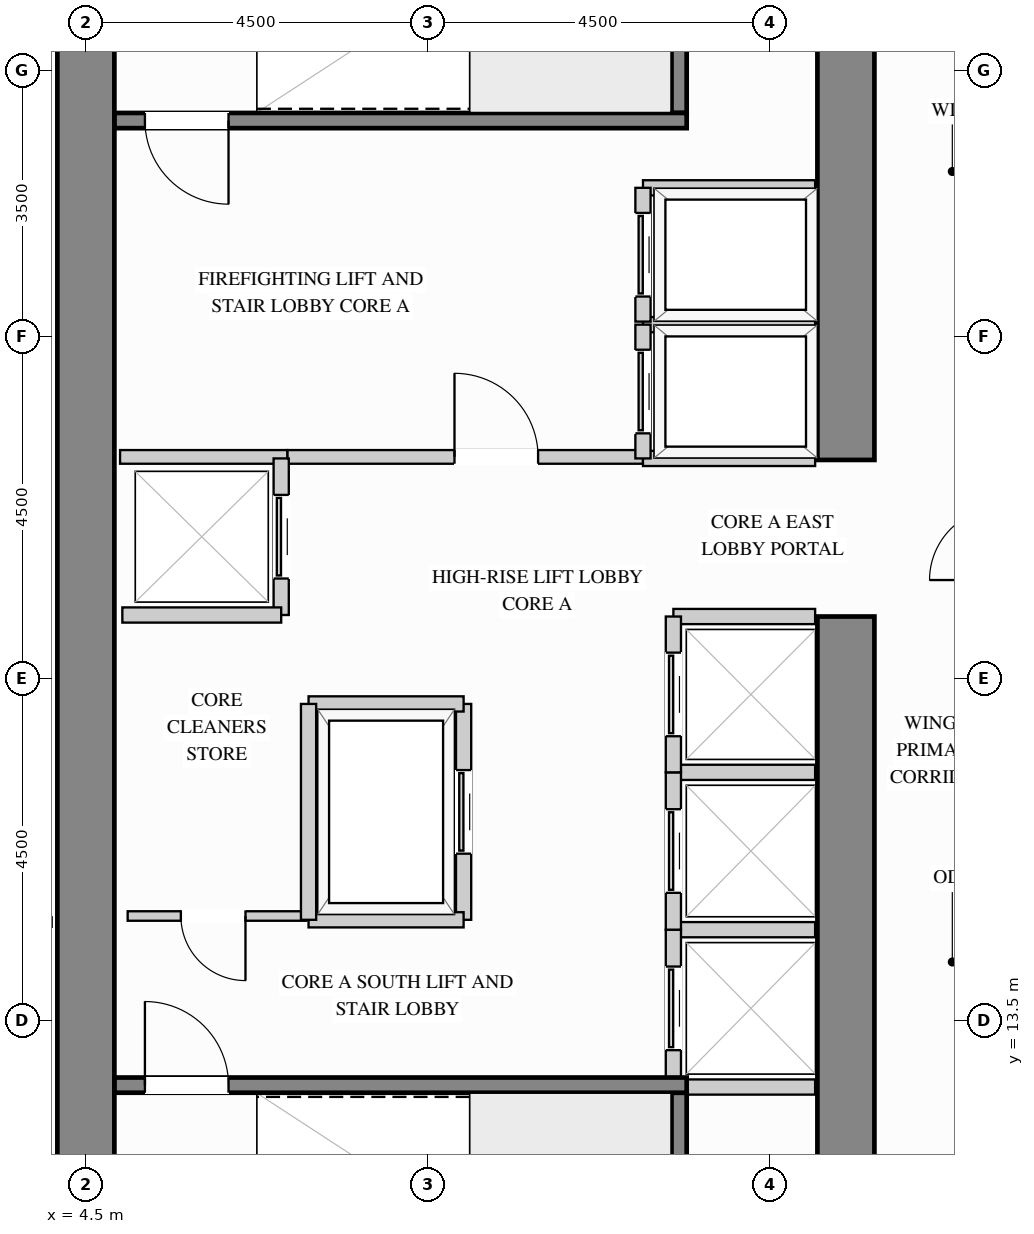
"""IFC4 building model, lengths in metres.
Left out: names, types, materials, properties, quantities, classifications, styles, units other than length and angle.
Written with IfcOpenShell. Run it as: python <this file> out.ifc"""

import sys

from ifc_helpers import new_model, si_unit, direction, frame, frame_2d, origin, place, context, subcontext, project, spatial, rectangle, extrude, source, transform, mapped, element, fill, save


model = new_model("IFC4")
c1 = context("Model", 3, precision=1e-05, world=origin(), true_north=direction((0.0, 1.0)))
c2 = subcontext(c1, "Body", "Model", "MODEL_VIEW")
j1 = project(units=[si_unit("LENGTHUNIT", "METRE"), si_unit("PLANEANGLEUNIT", "RADIAN")], contexts=[c1])
p1 = place(None, origin())
s1 = spatial("IfcSite", under=j1, at=p1, CompositionType="ELEMENT")
p2 = place(p1, origin())
s2 = spatial("IfcBuilding", under=s1, at=p2, CompositionType="ELEMENT")
p3 = place(p2, frame((0.0, 0.0, 102.6)))
s3 = spatial("IfcBuildingStorey", under=s2, at=p3, CompositionType="ELEMENT", Elevation=102.6)
m1 = source(origin(), c2, "Body", "SweptSolid", [
    extrude(rectangle(XDim=9.945, YDim=0.75, at=frame_2d((4.973, 0.0))), origin(), (0.0, 0.0, 1.0), 3.38),
])
p4 = place(p3, frame((14.5, 8.875, 0.0), z_axis=(0.0, 0.0, 1.0), x_axis=(0.0, 1.0, 0.0)))
e1 = element("IfcWall", 1, at=p4, inside=s3, PredefinedType="SHEAR", context=c2, shape_type="MappedRepresentation", body=[
    mapped(m1, transform((0.0, 0.0, 0.0), x_axis=(1.0, 0.0, 0.0), y_axis=(0.0, 1.0, 0.0), z_axis=(0.0, 0.0, 1.0))),
])
m2 = source(origin(), c2, "Body", "SweptSolid", [
    extrude(rectangle(XDim=8.245, YDim=0.75, at=frame_2d((4.123, 0.0))), origin(), (0.0, 0.0, 1.0), 3.38),
])
p5 = place(p3, frame((14.5, 20.88, 0.0), z_axis=(0.0, 0.0, 1.0), x_axis=(0.0, 1.0, 0.0)))
e2 = element("IfcWall", 2, at=p5, inside=s3, PredefinedType="SHEAR", context=c2, shape_type="MappedRepresentation", body=[
    mapped(m2, transform((0.0, 0.0, 0.0), x_axis=(1.0, 0.0, 0.0), y_axis=(0.0, 1.0, 0.0), z_axis=(0.0, 0.0, 1.0))),
])
m3 = source(origin(), c2, "Body", "SweptSolid", [
    extrude(rectangle(XDim=20.25, YDim=0.75, at=frame_2d((10.125, 0.0))), origin(), (0.0, 0.0, 1.0), 3.38),
])
p6 = place(p3, frame((4.5, 8.875, 0.0), z_axis=(0.0, 0.0, 1.0), x_axis=(0.0, 1.0, 0.0)))
e3 = element("IfcWall", 3, at=p6, inside=s3, PredefinedType="SHEAR", context=c2, shape_type="MappedRepresentation", body=[
    mapped(m3, transform((0.0, 0.0, 0.0), x_axis=(1.0, 0.0, 0.0), y_axis=(0.0, 1.0, 0.0), z_axis=(0.0, 0.0, 1.0))),
])
p7 = place(p3, frame((7.15, 20.92, 0.0), z_axis=(0.0, 0.0, 1.0), x_axis=(1.0, 0.0, 0.0)))
e4 = element("IfcWall", 4, at=p7, inside=s3, PredefinedType="PARTITIONING", context=c2, shape_type="SweptSolid", body=[
    extrude(rectangle(XDim=4.68, YDim=0.18, at=frame_2d((2.34, 0.0))), origin(), (0.0, 0.0, 1.0), 3.365),
])
p8 = place(p7, frame((2.2, 0.0, 0.0)))
e5 = element("IfcOpeningElement", 5, at=p8, cuts=e4, PredefinedType="OPENING", context=c2, shape_type="SweptSolid", body=[
    extrude(rectangle(XDim=1.1, YDim=2.15, at=frame_2d((0.55, 1.075))), frame((0.0, 0.1, 0.0), z_axis=(0.0, -1.0, 0.0), x_axis=(1.0, 0.0, 0.0)), (0.0, 0.0, 1.0), 0.2),
])
m4 = source(origin(), c2, "Body", "SweptSolid", [
    extrude(rectangle(XDim=2.2, YDim=0.18, at=frame_2d((1.1, 0.0))), origin(), (0.0, 0.0, 1.0), 3.365),
])
p9 = place(p3, frame((4.95, 20.92, 0.0), z_axis=(0.0, 0.0, 1.0), x_axis=(1.0, 0.0, 0.0)))
e6 = element("IfcWall", 6, at=p9, inside=s3, PredefinedType="PARTITIONING", context=c2, shape_type="MappedRepresentation", body=[
    mapped(m4, transform((0.0, 0.0, 0.0), x_axis=(1.0, 0.0, 0.0), y_axis=(0.0, 1.0, 0.0), z_axis=(0.0, 0.0, 1.0))),
])
p10 = place(p3, frame((5.05, 14.88, 0.0), z_axis=(0.0, 0.0, 1.0), x_axis=(1.0, 0.0, 0.0)))
e7 = element("IfcWall", 7, at=p10, inside=s3, PredefinedType="PARTITIONING", context=c2, shape_type="SweptSolid", body=[
    extrude(rectangle(XDim=2.35, YDim=0.125, at=frame_2d((1.175, 0.0))), origin(), (0.0, 0.0, 1.0), 3.365),
])
p11 = place(p10, frame((0.7, 0.0, 0.0)))
e8 = element("IfcOpeningElement", 8, at=p11, cuts=e7, PredefinedType="OPENING", context=c2, shape_type="SweptSolid", body=[
    extrude(rectangle(XDim=0.85, YDim=2.1, at=frame_2d((0.425, 1.05))), frame((0.0, 0.073, 0.0), z_axis=(0.0, -1.0, 0.0), x_axis=(1.0, 0.0, 0.0)), (0.0, 0.0, 1.0), 0.145),
])
m5 = source(origin(), c2, "Body", "SweptSolid", [
    extrude(rectangle(XDim=3.698, YDim=0.125, at=frame_2d((1.849, 0.0))), origin(), (0.0, 0.0, 1.0), 3.365),
])
p12 = place(p3, frame((0.352, 14.8, 0.0), z_axis=(0.0, 0.0, 1.0), x_axis=(1.0, 0.0, 0.0)))
e9 = element("IfcWall", 9, at=p12, inside=s3, PredefinedType="PARTITIONING", context=c2, shape_type="MappedRepresentation", body=[
    mapped(m5, transform((0.0, 0.0, 0.0), x_axis=(1.0, 0.0, 0.0), y_axis=(0.0, 1.0, 0.0), z_axis=(0.0, 0.0, 1.0))),
])
m6 = source(origin(), c2, "Body", "SweptSolid", [
    extrude(rectangle(XDim=2.265, YDim=0.2, at=frame_2d((1.132, 0.0))), origin(), (0.0, 0.0, 1.0), 3.365),
])
for number, where, z_axis, x_axis in (
    (10, (11.83, 22.66, 0.0), (0.0, 0.0, 1.0), (1.0, 0.0, 0.0)),
    (11, (11.83, 20.9, 0.0), (0.0, 0.0, 1.0), (1.0, 0.0, 0.0)),
):
    element("IfcWall", number, at=place(p3, frame(where, z_axis=z_axis, x_axis=x_axis)), inside=s3, PredefinedType="PARTITIONING", context=c2, shape_type="MappedRepresentation", body=[
        mapped(m6, transform((0.0, 0.0, 0.0), x_axis=(1.0, 0.0, 0.0), y_axis=(0.0, 1.0, 0.0), z_axis=(0.0, 0.0, 1.0))),
    ])
p13 = place(p3, frame((11.83, 20.9, 0.0), z_axis=(0.0, 0.0, 1.0), x_axis=(0.0, 1.0, 0.0)))
e12 = element("IfcWall", 12, at=p13, inside=s3, PredefinedType="PARTITIONING", context=c2, shape_type="SweptSolid", body=[
    extrude(rectangle(XDim=1.76, YDim=0.2, at=frame_2d((0.88, 0.0))), origin(), (0.0, 0.0, 1.0), 3.365),
])
p14 = place(p13, frame((0.33, 0.0, 0.0)))
e13 = element("IfcOpeningElement", 13, at=p14, cuts=e12, PredefinedType="OPENING", context=c2, shape_type="SweptSolid", body=[
    extrude(rectangle(XDim=1.1, YDim=2.2, at=frame_2d((0.55, 1.1))), frame((0.0, 0.11, 0.0), z_axis=(0.0, -1.0, 0.0), x_axis=(1.0, 0.0, 0.0)), (0.0, 0.0, 1.0), 0.22),
])
p15 = place(p3, frame((11.83, 24.46, 0.0), z_axis=(0.0, 0.0, 1.0), x_axis=(1.0, 0.0, 0.0)))
e14 = element("IfcWall", 14, at=p15, inside=s3, PredefinedType="PARTITIONING", context=c2, shape_type="MappedRepresentation", body=[
    mapped(m6, transform((0.0, 0.0, 0.0), x_axis=(1.0, 0.0, 0.0), y_axis=(0.0, 1.0, 0.0), z_axis=(0.0, 0.0, 1.0))),
])
p16 = place(p3, frame((11.83, 22.7, 0.0), z_axis=(0.0, 0.0, 1.0), x_axis=(0.0, 1.0, 0.0)))
e15 = element("IfcWall", 15, at=p16, inside=s3, PredefinedType="PARTITIONING", context=c2, shape_type="SweptSolid", body=[
    extrude(rectangle(XDim=1.76, YDim=0.2, at=frame_2d((0.88, 0.0))), origin(), (0.0, 0.0, 1.0), 3.365),
])
p17 = place(p16, frame((0.33, 0.0, 0.0)))
e16 = element("IfcOpeningElement", 16, at=p17, cuts=e15, PredefinedType="OPENING", context=c2, shape_type="SweptSolid", body=[
    extrude(rectangle(XDim=1.1, YDim=2.2, at=frame_2d((0.55, 1.1))), frame((0.0, 0.11, 0.0), z_axis=(0.0, -1.0, 0.0), x_axis=(1.0, 0.0, 0.0)), (0.0, 0.0, 1.0), 0.22),
])
m7 = source(origin(), c2, "Body", "SweptSolid", [
    extrude(rectangle(XDim=1.865, YDim=0.2, at=frame_2d((0.933, 0.0))), origin(), (0.0, 0.0, 1.0), 3.365),
])
for number, where, z_axis, x_axis in (
    (17, (12.23, 14.7, 0.0), (0.0, 0.0, 1.0), (1.0, 0.0, 0.0)),
    (18, (12.23, 12.63, 0.0), (0.0, 0.0, 1.0), (1.0, 0.0, 0.0)),
):
    element("IfcWall", number, at=place(p3, frame(where, z_axis=z_axis, x_axis=x_axis)), inside=s3, PredefinedType="PARTITIONING", context=c2, shape_type="MappedRepresentation", body=[
        mapped(m7, transform((0.0, 0.0, 0.0), x_axis=(1.0, 0.0, 0.0), y_axis=(0.0, 1.0, 0.0), z_axis=(0.0, 0.0, 1.0))),
    ])
p18 = place(p3, frame((12.23, 12.63, 0.0), z_axis=(0.0, 0.0, 1.0), x_axis=(0.0, 1.0, 0.0)))
e19 = element("IfcWall", 19, at=p18, inside=s3, PredefinedType="PARTITIONING", context=c2, shape_type="SweptSolid", body=[
    extrude(rectangle(XDim=2.07, YDim=0.2, at=frame_2d((1.035, 0.0))), origin(), (0.0, 0.0, 1.0), 3.365),
])
p19 = place(p18, frame((0.485, 0.0, 0.0)))
e20 = element("IfcOpeningElement", 20, at=p19, cuts=e19, PredefinedType="OPENING", context=c2, shape_type="SweptSolid", body=[
    extrude(rectangle(XDim=1.1, YDim=2.2, at=frame_2d((0.55, 1.1))), frame((0.0, 0.11, 0.0), z_axis=(0.0, -1.0, 0.0), x_axis=(1.0, 0.0, 0.0)), (0.0, 0.0, 1.0), 0.22),
])
p20 = place(p3, frame((12.23, 16.77, 0.0), z_axis=(0.0, 0.0, 1.0), x_axis=(1.0, 0.0, 0.0)))
e21 = element("IfcWall", 21, at=p20, inside=s3, PredefinedType="PARTITIONING", context=c2, shape_type="MappedRepresentation", body=[
    mapped(m7, transform((0.0, 0.0, 0.0), x_axis=(1.0, 0.0, 0.0), y_axis=(0.0, 1.0, 0.0), z_axis=(0.0, 0.0, 1.0))),
])
p21 = place(p3, frame((12.23, 14.7, 0.0), z_axis=(0.0, 0.0, 1.0), x_axis=(0.0, 1.0, 0.0)))
e22 = element("IfcWall", 22, at=p21, inside=s3, PredefinedType="PARTITIONING", context=c2, shape_type="SweptSolid", body=[
    extrude(rectangle(XDim=2.07, YDim=0.2, at=frame_2d((1.035, 0.0))), origin(), (0.0, 0.0, 1.0), 3.365),
])
p22 = place(p21, frame((0.485, 0.0, 0.0)))
e23 = element("IfcOpeningElement", 23, at=p22, cuts=e22, PredefinedType="OPENING", context=c2, shape_type="SweptSolid", body=[
    extrude(rectangle(XDim=1.1, YDim=2.2, at=frame_2d((0.55, 1.1))), frame((0.0, 0.11, 0.0), z_axis=(0.0, -1.0, 0.0), x_axis=(1.0, 0.0, 0.0)), (0.0, 0.0, 1.0), 0.22),
])
p23 = place(p3, frame((12.23, 18.82, 0.0), z_axis=(0.0, 0.0, 1.0), x_axis=(1.0, 0.0, 0.0)))
e24 = element("IfcWall", 24, at=p23, inside=s3, PredefinedType="PARTITIONING", context=c2, shape_type="MappedRepresentation", body=[
    mapped(m7, transform((0.0, 0.0, 0.0), x_axis=(1.0, 0.0, 0.0), y_axis=(0.0, 1.0, 0.0), z_axis=(0.0, 0.0, 1.0))),
])
p24 = place(p3, frame((12.23, 16.77, 0.0), z_axis=(0.0, 0.0, 1.0), x_axis=(0.0, 1.0, 0.0)))
e25 = element("IfcWall", 25, at=p24, inside=s3, PredefinedType="PARTITIONING", context=c2, shape_type="SweptSolid", body=[
    extrude(rectangle(XDim=2.05, YDim=0.2, at=frame_2d((1.025, 0.0))), origin(), (0.0, 0.0, 1.0), 3.365),
])
p25 = place(p24, frame((0.475, 0.0, 0.0)))
e26 = element("IfcOpeningElement", 26, at=p25, cuts=e25, PredefinedType="OPENING", context=c2, shape_type="SweptSolid", body=[
    extrude(rectangle(XDim=1.1, YDim=2.2, at=frame_2d((0.55, 1.1))), frame((0.0, 0.11, 0.0), z_axis=(0.0, -1.0, 0.0), x_axis=(1.0, 0.0, 0.0)), (0.0, 0.0, 1.0), 0.22),
])
p26 = place(p3, frame((7.07, 18.84, 0.0), z_axis=(0.0, 0.0, 1.0), x_axis=(0.0, 1.0, 0.0)))
e27 = element("IfcWall", 27, at=p26, inside=s3, PredefinedType="PARTITIONING", context=c2, shape_type="SweptSolid", body=[
    extrude(rectangle(XDim=2.06, YDim=0.2, at=frame_2d((1.03, 0.0))), origin(), (0.0, 0.0, 1.0), 3.365),
])
p27 = place(p26, frame((0.48, 0.0, 0.0)))
e28 = element("IfcOpeningElement", 28, at=p27, cuts=e27, PredefinedType="OPENING", context=c2, shape_type="SweptSolid", body=[
    extrude(rectangle(XDim=1.1, YDim=2.2, at=frame_2d((0.55, 1.1))), frame((0.0, 0.11, 0.0), z_axis=(0.0, -1.0, 0.0), x_axis=(1.0, 0.0, 0.0)), (0.0, 0.0, 1.0), 0.22),
])
m8 = source(origin(), c2, "Body", "SweptSolid", [
    extrude(rectangle(XDim=2.09, YDim=0.2, at=frame_2d((1.045, 0.0))), origin(), (0.0, 0.0, 1.0), 3.365),
])
p28 = place(p3, frame((4.98, 18.84, 0.0), z_axis=(0.0, 0.0, 1.0), x_axis=(1.0, 0.0, 0.0)))
e29 = element("IfcWall", 29, at=p28, inside=s3, PredefinedType="PARTITIONING", context=c2, shape_type="MappedRepresentation", body=[
    mapped(m8, transform((0.0, 0.0, 0.0), x_axis=(1.0, 0.0, 0.0), y_axis=(0.0, 1.0, 0.0), z_axis=(0.0, 0.0, 1.0))),
])
p29 = place(p3, frame((9.47, 14.83, 0.0), z_axis=(0.0, 0.0, 1.0), x_axis=(0.0, 1.0, 0.0)))
e30 = element("IfcWall", 30, at=p29, inside=s3, PredefinedType="PARTITIONING", context=c2, shape_type="SweptSolid", body=[
    extrude(rectangle(XDim=2.84, YDim=0.2, at=frame_2d((1.42, 0.0))), origin(), (0.0, 0.0, 1.0), 3.365),
])
p30 = place(p29, frame((0.87, 0.0, 0.0)))
e31 = element("IfcOpeningElement", 31, at=p30, cuts=e30, PredefinedType="OPENING", context=c2, shape_type="SweptSolid", body=[
    extrude(rectangle(XDim=1.1, YDim=2.2, at=frame_2d((0.55, 1.1))), frame((0.0, 0.11, 0.0), z_axis=(0.0, -1.0, 0.0), x_axis=(1.0, 0.0, 0.0)), (0.0, 0.0, 1.0), 0.22),
])
m9 = source(origin(), c2, "Body", "SweptSolid", [
    extrude(rectangle(XDim=2.04, YDim=0.2, at=frame_2d((1.02, 0.0))), origin(), (0.0, 0.0, 1.0), 3.365),
])
for number, where, z_axis, x_axis in (
    (32, (7.43, 17.67, 0.0), (0.0, 0.0, 1.0), (1.0, 0.0, 0.0)),
    (33, (7.43, 14.83, 0.0), (0.0, 0.0, 1.0), (1.0, 0.0, 0.0)),
):
    element("IfcWall", number, at=place(p3, frame(where, z_axis=z_axis, x_axis=x_axis)), inside=s3, PredefinedType="PARTITIONING", context=c2, shape_type="MappedRepresentation", body=[
        mapped(m9, transform((0.0, 0.0, 0.0), x_axis=(1.0, 0.0, 0.0), y_axis=(0.0, 1.0, 0.0), z_axis=(0.0, 0.0, 1.0))),
    ])
m10 = source(origin(), c2, "Body", "SweptSolid", [
    extrude(rectangle(XDim=2.84, YDim=0.2, at=frame_2d((1.42, 0.0))), origin(), (0.0, 0.0, 1.0), 3.365),
])
p31 = place(p3, frame((7.43, 14.83, 0.0), z_axis=(0.0, 0.0, 1.0), x_axis=(0.0, 1.0, 0.0)))
e34 = element("IfcWall", 34, at=p31, inside=s3, PredefinedType="PARTITIONING", context=c2, shape_type="MappedRepresentation", body=[
    mapped(m10, transform((0.0, 0.0, 0.0), x_axis=(1.0, 0.0, 0.0), y_axis=(0.0, 1.0, 0.0), z_axis=(0.0, 0.0, 1.0))),
])
m11 = source(origin(), c2, "Body", "SweptSolid", [
    extrude(rectangle(XDim=3.678, YDim=0.2, at=frame_2d((1.839, 0.0))), origin(), (0.0, 0.0, 1.0), 3.38),
])
p32 = place(p3, frame((12.305, 8.877, 0.0), z_axis=(0.0, 0.0, 1.0), x_axis=(0.0, 1.0, 0.0)))
e35 = element("IfcWall", 35, at=p32, inside=s3, PredefinedType="SHEAR", context=c2, shape_type="MappedRepresentation", body=[
    mapped(m11, transform((0.0, 0.0, 0.0), x_axis=(1.0, 0.0, 0.0), y_axis=(0.0, 1.0, 0.0), z_axis=(0.0, 0.0, 1.0))),
])
p33 = place(p3, frame((4.877, 12.655, 0.0), z_axis=(0.0, 0.0, 1.0), x_axis=(1.0, 0.0, 0.0)))
e36 = element("IfcWall", 36, at=p33, inside=s3, PredefinedType="SHEAR", context=c2, shape_type="SweptSolid", body=[
    extrude(rectangle(XDim=7.528, YDim=0.2, at=frame_2d((3.764, 0.0))), origin(), (0.0, 0.0, 1.0), 3.38),
])
p34 = place(p33, frame((0.4, 0.0, 0.0)))
e37 = element("IfcOpeningElement", 37, at=p34, cuts=e36, PredefinedType="OPENING", context=c2, shape_type="SweptSolid", body=[
    extrude(rectangle(XDim=1.1, YDim=2.15, at=frame_2d((0.55, 1.075))), frame((0.0, 0.11, 0.0), z_axis=(0.0, -1.0, 0.0), x_axis=(1.0, 0.0, 0.0)), (0.0, 0.0, 1.0), 0.22),
])
p35 = place(p3, frame((12.305, 25.445, 0.0), z_axis=(0.0, 0.0, 1.0), x_axis=(0.0, 1.0, 0.0)))
e38 = element("IfcWall", 38, at=p35, inside=s3, PredefinedType="SHEAR", context=c2, shape_type="MappedRepresentation", body=[
    mapped(m11, transform((0.0, 0.0, 0.0), x_axis=(1.0, 0.0, 0.0), y_axis=(0.0, 1.0, 0.0), z_axis=(0.0, 0.0, 1.0))),
])
p36 = place(p3, frame((4.877, 25.345, 0.0), z_axis=(0.0, 0.0, 1.0), x_axis=(1.0, 0.0, 0.0)))
e39 = element("IfcWall", 39, at=p36, inside=s3, PredefinedType="SHEAR", context=c2, shape_type="SweptSolid", body=[
    extrude(rectangle(XDim=7.528, YDim=0.2, at=frame_2d((3.764, 0.0))), origin(), (0.0, 0.0, 1.0), 3.38),
])
p37 = place(p36, frame((0.4, 0.0, 0.0)))
e40 = element("IfcOpeningElement", 40, at=p37, cuts=e39, PredefinedType="OPENING", context=c2, shape_type="SweptSolid", body=[
    extrude(rectangle(XDim=1.1, YDim=2.15, at=frame_2d((0.55, 1.075))), frame((0.0, 0.11, 0.0), z_axis=(0.0, -1.0, 0.0), x_axis=(1.0, 0.0, 0.0)), (0.0, 0.0, 1.0), 0.22),
])
m12 = source(origin(), c2, "Body", "SweptSolid", [
    extrude(rectangle(XDim=1.1, YDim=2.15, at=frame_2d((0.55, 1.075))), frame((0.0, 0.025, 0.0), z_axis=(0.0, -1.0, 0.0), x_axis=(1.0, 0.0, 0.0)), (0.0, 0.0, 1.0), 0.05),
])
p38 = place(p8, origin())
e41 = element("IfcDoor", 41, at=p38, inside=s3, OperationType="SINGLE_SWING_LEFT", PredefinedType="DOOR", context=c2, shape_type="MappedRepresentation", body=[
    mapped(m12, transform((0.0, 0.0, 0.0), x_axis=(1.0, 0.0, 0.0), y_axis=(0.0, 1.0, 0.0), z_axis=(0.0, 0.0, 1.0))),
])
fill(e5, e41)
m13 = source(origin(), c2, "Body", "SweptSolid", [
    extrude(rectangle(XDim=1.1, YDim=2.2, at=frame_2d((0.55, 1.1))), frame((0.0, 0.025, 0.0), z_axis=(0.0, -1.0, 0.0), x_axis=(1.0, 0.0, 0.0)), (0.0, 0.0, 1.0), 0.05),
])
p39 = place(p14, origin())
e42 = element("IfcDoor", 42, at=p39, inside=s3, OperationType="SLIDING_TO_LEFT", PredefinedType="DOOR", context=c2, shape_type="MappedRepresentation", body=[
    mapped(m13, transform((0.0, 0.0, 0.0), x_axis=(1.0, 0.0, 0.0), y_axis=(0.0, 1.0, 0.0), z_axis=(0.0, 0.0, 1.0))),
])
fill(e13, e42)
p40 = place(p17, origin())
e43 = element("IfcDoor", 43, at=p40, inside=s3, OperationType="SLIDING_TO_LEFT", PredefinedType="DOOR", context=c2, shape_type="MappedRepresentation", body=[
    mapped(m13, transform((0.0, 0.0, 0.0), x_axis=(1.0, 0.0, 0.0), y_axis=(0.0, 1.0, 0.0), z_axis=(0.0, 0.0, 1.0))),
])
fill(e16, e43)
p41 = place(p19, origin())
e44 = element("IfcDoor", 44, at=p41, inside=s3, OperationType="SLIDING_TO_LEFT", PredefinedType="DOOR", context=c2, shape_type="MappedRepresentation", body=[
    mapped(m13, transform((0.0, 0.0, 0.0), x_axis=(1.0, 0.0, 0.0), y_axis=(0.0, 1.0, 0.0), z_axis=(0.0, 0.0, 1.0))),
])
fill(e20, e44)
p42 = place(p22, origin())
e45 = element("IfcDoor", 45, at=p42, inside=s3, OperationType="SLIDING_TO_LEFT", PredefinedType="DOOR", context=c2, shape_type="MappedRepresentation", body=[
    mapped(m13, transform((0.0, 0.0, 0.0), x_axis=(1.0, 0.0, 0.0), y_axis=(0.0, 1.0, 0.0), z_axis=(0.0, 0.0, 1.0))),
])
fill(e23, e45)
p43 = place(p25, origin())
e46 = element("IfcDoor", 46, at=p43, inside=s3, OperationType="SLIDING_TO_LEFT", PredefinedType="DOOR", context=c2, shape_type="MappedRepresentation", body=[
    mapped(m13, transform((0.0, 0.0, 0.0), x_axis=(1.0, 0.0, 0.0), y_axis=(0.0, 1.0, 0.0), z_axis=(0.0, 0.0, 1.0))),
])
fill(e26, e46)
p44 = place(p27, origin())
e47 = element("IfcDoor", 47, at=p44, inside=s3, OperationType="SLIDING_TO_LEFT", PredefinedType="DOOR", context=c2, shape_type="MappedRepresentation", body=[
    mapped(m13, transform((0.0, 0.0, 0.0), x_axis=(1.0, 0.0, 0.0), y_axis=(0.0, 1.0, 0.0), z_axis=(0.0, 0.0, 1.0))),
])
fill(e28, e47)
p45 = place(p30, origin())
e48 = element("IfcDoor", 48, at=p45, inside=s3, OperationType="SLIDING_TO_LEFT", PredefinedType="DOOR", context=c2, shape_type="MappedRepresentation", body=[
    mapped(m13, transform((0.0, 0.0, 0.0), x_axis=(1.0, 0.0, 0.0), y_axis=(0.0, 1.0, 0.0), z_axis=(0.0, 0.0, 1.0))),
])
fill(e31, e48)
m14 = source(origin(), c2, "Body", "SweptSolid", [
    extrude(rectangle(XDim=0.85, YDim=2.1, at=frame_2d((0.425, 1.05))), frame((0.0, 0.025, 0.0), z_axis=(0.0, -1.0, 0.0), x_axis=(1.0, 0.0, 0.0)), (0.0, 0.0, 1.0), 0.05),
])
p46 = place(p11, origin())
e49 = element("IfcDoor", 49, at=p46, inside=s3, OperationType="SINGLE_SWING_RIGHT", PredefinedType="DOOR", context=c2, shape_type="MappedRepresentation", body=[
    mapped(m14, transform((0.0, 0.0, 0.0), x_axis=(1.0, 0.0, 0.0), y_axis=(0.0, 1.0, 0.0), z_axis=(0.0, 0.0, 1.0))),
])
fill(e8, e49)
m15 = source(origin(), c2, "Body", "SweptSolid", [
    extrude(rectangle(XDim=1.1, YDim=2.15, at=frame_2d((0.55, 1.075))), frame((0.0, 0.025, 0.0), z_axis=(0.0, -1.0, 0.0), x_axis=(1.0, 0.0, 0.0)), (0.0, 0.0, 1.0), 0.05),
])
p47 = place(p34, origin())
e50 = element("IfcDoor", 50, at=p47, inside=s3, OperationType="SINGLE_SWING_LEFT", PredefinedType="DOOR", context=c2, shape_type="MappedRepresentation", body=[
    mapped(m15, transform((0.0, 0.0, 0.0), x_axis=(1.0, 0.0, 0.0), y_axis=(0.0, 1.0, 0.0), z_axis=(0.0, 0.0, 1.0))),
])
fill(e37, e50)
p48 = place(p37, origin())
e51 = element("IfcDoor", 51, at=p48, inside=s3, OperationType="SINGLE_SWING_RIGHT", PredefinedType="DOOR", context=c2, shape_type="MappedRepresentation", body=[
    mapped(m15, transform((0.0, 0.0, 0.0), x_axis=(1.0, 0.0, 0.0), y_axis=(0.0, 1.0, 0.0), z_axis=(0.0, 0.0, 1.0))),
])
fill(e40, e51)
save(model, sys.argv[1])
